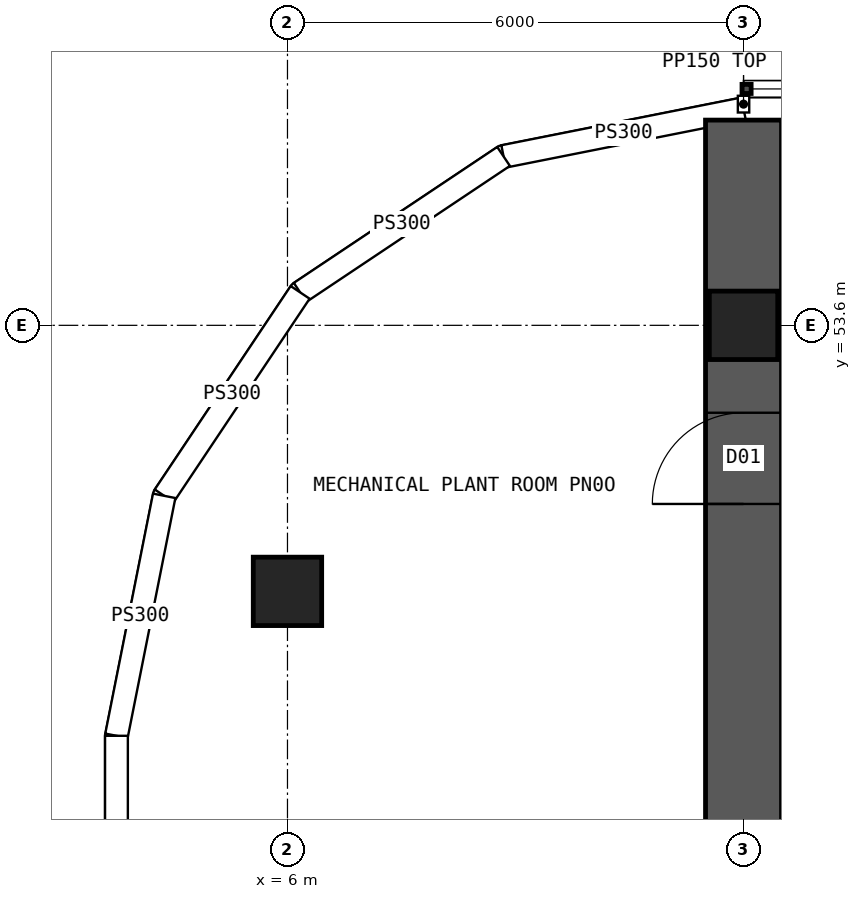
"""IFC4 building model, lengths in metres.
Left out: names, types, materials, properties, quantities, classifications, styles, units other than length and angle.
Written with IfcOpenShell. Run it as: python <this file> out.ifc"""

import sys

from ifc_helpers import new_model, si_unit, direction, frame, frame_2d, origin, origin_2d, place, context, subcontext, project, spatial, polyline, rectangle, hollow_rectangle, outline, extrude, element, fill, save


model = new_model("IFC4")
c1 = context("Model", 3, precision=1e-05, world=origin(), true_north=direction((0.0, 1.0)))
c2 = subcontext(c1, "Body", "Model", "MODEL_VIEW")
j1 = project(units=[si_unit("LENGTHUNIT", "METRE"), si_unit("PLANEANGLEUNIT", "RADIAN")], contexts=[c1])
p1 = place(None, origin())
s1 = spatial("IfcSite", under=j1, at=p1, CompositionType="ELEMENT")
p2 = place(p1, origin())
s2 = spatial("IfcBuilding", under=s1, at=p2, CompositionType="ELEMENT")
p3 = place(p2, frame((0.0, 0.0, 68.95)))
s3 = spatial("IfcBuildingStorey", under=s2, at=p3, CompositionType="ELEMENT", Elevation=68.95)
for number, where, z_axis, x_axis in (
    (1, (12.0, 53.6, 0.0), (0.0, 0.0, 1.0), (1.0, 0.0, 0.0)),
    (2, (6.0, 50.1, 0.0), (0.0, 0.0, 1.0), (1.0, 0.0, 0.0)),
):
    element("IfcColumn", number, at=place(p3, frame(where, z_axis=z_axis, x_axis=x_axis)), inside=s3, PredefinedType="COLUMN", context=c2, shape_type="SweptSolid", body=[
        extrude(hollow_rectangle(XDim=0.9, YDim=0.9, WallThickness=0.09, at=origin_2d()), origin(), (0.0, 0.0, 1.0), 7.2),
    ])
p4 = place(p3, frame((12.0, 7.7, 0.0), z_axis=(0.0, 0.0, 1.0), x_axis=(0.0, 1.0, 0.0)))
e3 = element("IfcWall", 3, at=p4, inside=s3, PredefinedType="SHEAR", context=c2, shape_type="SweptSolid", body=[
    extrude(rectangle(XDim=48.6, YDim=1.0, at=frame_2d((24.3, 0.0))), origin(), (0.0, 0.0, 1.0), 7.2),
])
p5 = place(p4, frame((3.85, 0.0, 0.0)))
e4 = element("IfcOpeningElement", 4, at=p5, cuts=e3, PredefinedType="OPENING", context=c2, shape_type="SweptSolid", body=[
    extrude(rectangle(XDim=1.2, YDim=2.1, at=frame_2d((0.6, 1.05))), frame((0.0, 0.51, 0.0), z_axis=(0.0, -1.0, 0.0), x_axis=(1.0, 0.0, 0.0)), (0.0, 0.0, 1.0), 1.02),
])
p6 = place(p4, frame((11.35, 0.0, 0.0)))
e5 = element("IfcOpeningElement", 5, at=p6, cuts=e3, PredefinedType="OPENING", context=c2, shape_type="SweptSolid", body=[
    extrude(rectangle(XDim=1.2, YDim=2.1, at=frame_2d((0.6, 1.05))), frame((0.0, 0.51, 0.0), z_axis=(0.0, -1.0, 0.0), x_axis=(1.0, 0.0, 0.0)), (0.0, 0.0, 1.0), 1.02),
])
p7 = place(p4, frame((43.55, 0.0, 0.0)))
e6 = element("IfcOpeningElement", 6, at=p7, cuts=e3, PredefinedType="OPENING", context=c2, shape_type="SweptSolid", body=[
    extrude(rectangle(XDim=1.2, YDim=2.1, at=frame_2d((0.6, 1.05))), frame((0.0, 0.51, 0.0), z_axis=(0.0, -1.0, 0.0), x_axis=(1.0, 0.0, 0.0)), (0.0, 0.0, 1.0), 1.02),
])
p8 = place(p4, frame((36.05, 0.0, 0.0)))
e7 = element("IfcOpeningElement", 7, at=p8, cuts=e3, PredefinedType="OPENING", context=c2, shape_type="SweptSolid", body=[
    extrude(rectangle(XDim=1.2, YDim=2.1, at=frame_2d((0.6, 1.05))), frame((0.0, 0.51, 0.0), z_axis=(0.0, -1.0, 0.0), x_axis=(1.0, 0.0, 0.0)), (0.0, 0.0, 1.0), 1.02),
])
p9 = place(p3, frame((3.75, 48.2, 0.0), z_axis=(0.0, 0.0, 1.0), x_axis=(0.0, -1.0, 0.0)))
e8 = element("IfcWall", 8, at=p9, inside=s3, PredefinedType="SOLIDWALL", context=c2, shape_type="SweptSolid", body=[
    extrude(outline(polyline([(-0.015, -0.15), (32.415, -0.15), (32.385, 0.15), (0.015, 0.15), (-0.015, -0.15)])), origin(), (0.0, 0.0, 1.0), 6.9),
])
p10 = place(p3, frame((12.0, 56.45, 0.0), z_axis=(0.0, 0.0, 1.0), x_axis=(-0.980787251524, -0.195080412259, 0.0)))
e9 = element("IfcWall", 9, at=p10, inside=s3, PredefinedType="SOLIDWALL", context=c2, shape_type="SweptSolid", body=[
    extrude(outline(polyline([(-0.03, -0.15), (3.249, -0.15), (3.189, 0.15), (0.03, 0.15), (-0.03, -0.15)])), origin(), (0.0, 0.0, 1.0), 6.9),
])
p11 = place(p3, frame((8.843, 55.822, 0.0), z_axis=(0.0, 0.0, 1.0), x_axis=(-0.831478105043, -0.555557522525, 0.0)))
e10 = element("IfcWall", 10, at=p11, inside=s3, PredefinedType="SOLIDWALL", context=c2, shape_type="SweptSolid", body=[
    extrude(outline(polyline([(-0.03, -0.15), (3.249, -0.15), (3.189, 0.15), (0.03, 0.15), (-0.03, -0.15)])), origin(), (0.0, 0.0, 1.0), 6.9),
])
p12 = place(p3, frame((6.167, 54.034, 0.0), z_axis=(0.0, 0.0, 1.0), x_axis=(-0.555609954424, -0.831443069936, 0.0)))
e11 = element("IfcWall", 11, at=p12, inside=s3, PredefinedType="SOLIDWALL", context=c2, shape_type="SweptSolid", body=[
    extrude(outline(polyline([(-0.03, -0.15), (3.249, -0.15), (3.189, 0.15), (0.03, 0.15), (-0.03, -0.15)])), origin(), (0.0, 0.0, 1.0), 6.9),
])
p13 = place(p3, frame((4.378, 51.357, 0.0), z_axis=(0.0, 0.0, 1.0), x_axis=(-0.195065901187, -0.980790137692, 0.0)))
e12 = element("IfcWall", 12, at=p13, inside=s3, PredefinedType="SOLIDWALL", context=c2, shape_type="SweptSolid", body=[
    extrude(outline(polyline([(-0.03, -0.15), (3.234, -0.15), (3.204, 0.15), (0.03, 0.15), (-0.03, -0.15)])), origin(), (0.0, 0.0, 1.0), 6.9),
])
p14 = place(p3, frame((12.0, 56.4, 0.0), z_axis=(0.0, 0.0, 1.0), x_axis=(0.0, 1.0, 0.0)))
e13 = element("IfcWall", 13, at=p14, inside=s3, PredefinedType="PARTITIONING", context=c2, shape_type="SweptSolid", body=[
    extrude(rectangle(XDim=0.22, YDim=0.15, at=frame_2d((0.11, 0.0))), origin(), (0.0, 0.0, 1.0), 6.9),
])
p15 = place(p7, origin())
e14 = element("IfcDoor", 14, at=p15, inside=s3, OperationType="SINGLE_SWING_LEFT", PredefinedType="DOOR", context=c2, shape_type="SweptSolid", body=[
    extrude(rectangle(XDim=1.2, YDim=2.1, at=frame_2d((0.6, 1.05))), frame((0.0, 0.485, 0.0), z_axis=(0.0, -1.0, 0.0), x_axis=(1.0, 0.0, 0.0)), (0.0, 0.0, 1.0), 0.05),
])
fill(e6, e14)
save(model, sys.argv[1])
